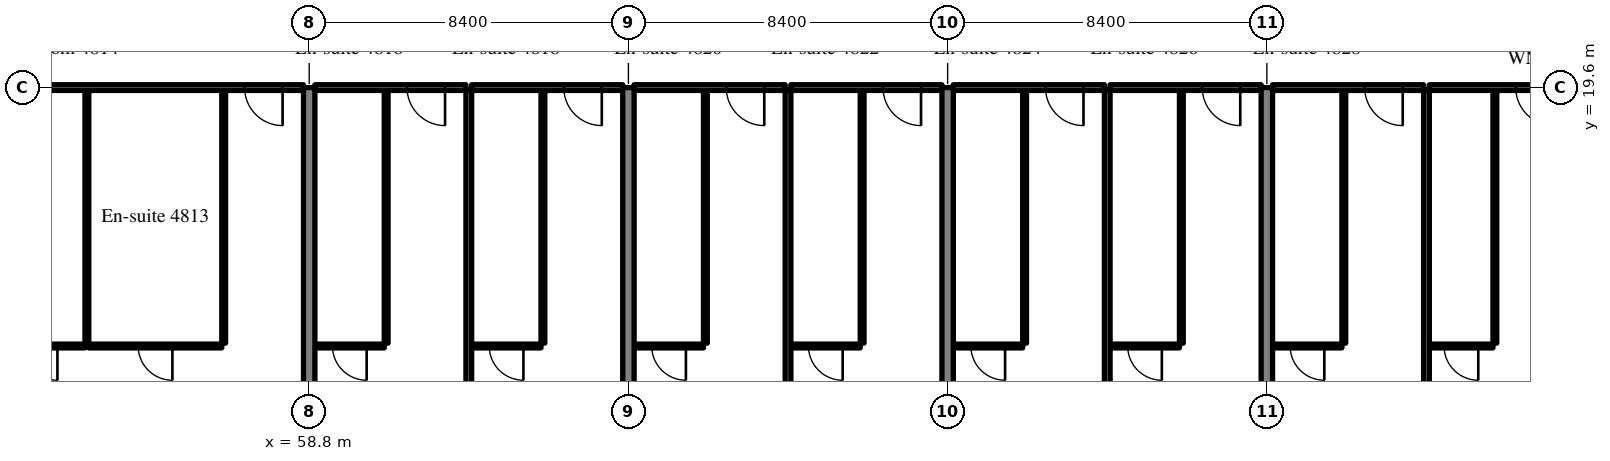
"""IFC4 building model, lengths in metres.
Left out: names, types, materials, properties, quantities, classifications, styles, units other than length and angle.
Written with IfcOpenShell. Run it as: python <this file> out.ifc"""

import sys

from ifc_helpers import new_model, si_unit, direction, frame, frame_2d, origin, place, context, subcontext, project, spatial, rectangle, extrude, source, transform, mapped, element, fill, save


model = new_model("IFC4")
c1 = context("Model", 3, precision=1e-05, world=origin(), true_north=direction((0.0, 1.0)))
c2 = subcontext(c1, "Body", "Model", "MODEL_VIEW")
j1 = project(units=[si_unit("LENGTHUNIT", "METRE"), si_unit("PLANEANGLEUNIT", "RADIAN")], contexts=[c1])
p1 = place(None, origin())
s1 = spatial("IfcSite", under=j1, at=p1, CompositionType="ELEMENT")
p2 = place(p1, origin())
s2 = spatial("IfcBuilding", under=s1, at=p2, CompositionType="ELEMENT")
p3 = place(p2, frame((0.0, 0.0, 197.2)))
s3 = spatial("IfcBuildingStorey", under=s2, at=p3, CompositionType="ELEMENT", Elevation=197.2)
m1 = source(origin(), c2, "Body", "SweptSolid", [
    extrude(rectangle(XDim=14.1, YDim=0.3, at=frame_2d((7.05, 0.0))), origin(), (0.0, 0.0, 1.0), 3.52),
])
for number, where, z_axis, x_axis in (
    (1, (58.8, 5.5, 0.0), (0.0, 0.0, 1.0), (0.0, 1.0, 0.0)),
    (2, (67.2, 5.5, 0.0), (0.0, 0.0, 1.0), (0.0, 1.0, 0.0)),
    (3, (75.6, 5.5, 0.0), (0.0, 0.0, 1.0), (0.0, 1.0, 0.0)),
    (4, (84.0, 5.5, 0.0), (0.0, 0.0, 1.0), (0.0, 1.0, 0.0)),
):
    element("IfcWall", number, at=place(p3, frame(where, z_axis=z_axis, x_axis=x_axis)), inside=s3, PredefinedType="SHEAR", context=c2, shape_type="MappedRepresentation", body=[
        mapped(m1, transform((0.0, 0.0, 0.0), scale=1.0)),
    ])
m2 = source(origin(), c2, "Body", "SweptSolid", [
    extrude(rectangle(XDim=6.65, YDim=0.1, at=frame_2d((3.325, 0.0))), origin(), (0.0, 0.0, 1.0), 3.52),
])
for number, where, z_axis, x_axis in (
    (5, (56.55, 12.875, 0.0), (0.0, 0.0, 1.0), (0.0, 1.0, 0.0)),
    (6, (52.95, 12.875, 0.0), (0.0, 0.0, 1.0), (0.0, 1.0, 0.0)),
):
    element("IfcWall", number, at=place(p3, frame(where, z_axis=z_axis, x_axis=x_axis)), inside=s3, PredefinedType="PARTITIONING", context=c2, shape_type="MappedRepresentation", body=[
        mapped(m2, transform((0.0, 0.0, 0.0), scale=1.0)),
    ])
m3 = source(origin(), c2, "Body", "SweptSolid", [
    extrude(rectangle(XDim=3.5, YDim=0.1, at=frame_2d((1.75, 0.0))), origin(), (0.0, 0.0, 1.0), 3.52),
])
p4 = place(p3, frame((53.0, 12.8, 0.0), z_axis=(0.0, 0.0, 1.0), x_axis=(1.0, 0.0, 0.0)))
e7 = element("IfcWall", 7, at=p4, inside=s3, PredefinedType="PARTITIONING", context=c2, shape_type="MappedRepresentation", body=[
    mapped(m3, transform((0.0, 0.0, 0.0), scale=1.0)),
])
m4 = source(origin(), c2, "Body", "SweptSolid", [
    extrude(rectangle(XDim=0.9, YDim=2.1, at=frame_2d((0.45, 1.05))), frame((0.0, 0.06, 0.0), z_axis=(0.0, -1.0, 0.0), x_axis=(1.0, 0.0, 0.0)), (0.0, 0.0, 1.0), 0.12),
])
p5 = place(p4, frame((1.3, 0.0, 0.0)))
e8 = element("IfcOpeningElement", 8, at=p5, cuts=e7, PredefinedType="OPENING", context=c2, shape_type="MappedRepresentation", body=[
    mapped(m4, transform((0.0, 0.0, 0.0), scale=1.0)),
])
m5 = source(origin(), c2, "Body", "SweptSolid", [
    extrude(rectangle(XDim=2.35, YDim=0.1, at=frame_2d((1.175, 0.0))), origin(), (0.0, 0.0, 1.0), 3.52),
])
p6 = place(p3, frame((50.55, 12.8, 0.0), z_axis=(0.0, 0.0, 1.0), x_axis=(1.0, 0.0, 0.0)))
e9 = element("IfcWall", 9, at=p6, inside=s3, PredefinedType="PARTITIONING", context=c2, shape_type="MappedRepresentation", body=[
    mapped(m5, transform((0.0, 0.0, 0.0), scale=1.0)),
])
p7 = place(p6, frame((0.725, 0.0, 0.0)))
e10 = element("IfcOpeningElement", 10, at=p7, cuts=e9, PredefinedType="OPENING", context=c2, shape_type="MappedRepresentation", body=[
    mapped(m4, transform((0.0, 0.0, 0.0), scale=1.0)),
])
m6 = source(origin(), c2, "Body", "SweptSolid", [
    extrude(rectangle(XDim=8.1, YDim=0.15, at=frame_2d((4.05, 0.0))), origin(), (0.0, 0.0, 1.0), 2.82),
])
p8 = place(p3, frame((50.55, 19.6, 0.0), z_axis=(0.0, 0.0, 1.0), x_axis=(1.0, 0.0, 0.0)))
e11 = element("IfcWall", 11, at=p8, inside=s3, PredefinedType="PARTITIONING", context=c2, shape_type="MappedRepresentation", body=[
    mapped(m6, transform((0.0, 0.0, 0.0), scale=1.0)),
])
m7 = source(origin(), c2, "Body", "SweptSolid", [
    extrude(rectangle(XDim=1.0, YDim=2.1, at=frame_2d((0.5, 1.05))), frame((0.0, 0.085, 0.0), z_axis=(0.0, -1.0, 0.0), x_axis=(1.0, 0.0, 0.0)), (0.0, 0.0, 1.0), 0.17),
])
p9 = place(p8, frame((6.55, 0.0, 0.0)))
e12 = element("IfcOpeningElement", 12, at=p9, cuts=e11, PredefinedType="OPENING", context=c2, shape_type="MappedRepresentation", body=[
    mapped(m7, transform((0.0, 0.0, 0.0), scale=1.0)),
])
p10 = place(p3, frame((60.825, 12.875, 0.0), z_axis=(0.0, 0.0, 1.0), x_axis=(0.0, 1.0, 0.0)))
e13 = element("IfcWall", 13, at=p10, inside=s3, PredefinedType="PARTITIONING", context=c2, shape_type="MappedRepresentation", body=[
    mapped(m2, transform((0.0, 0.0, 0.0), scale=1.0)),
])
m8 = source(origin(), c2, "Body", "SweptSolid", [
    extrude(rectangle(XDim=1.825, YDim=0.1, at=frame_2d((0.913, 0.0))), origin(), (0.0, 0.0, 1.0), 3.52),
])
p11 = place(p3, frame((58.95, 12.8, 0.0), z_axis=(0.0, 0.0, 1.0), x_axis=(1.0, 0.0, 0.0)))
e14 = element("IfcWall", 14, at=p11, inside=s3, PredefinedType="PARTITIONING", context=c2, shape_type="MappedRepresentation", body=[
    mapped(m8, transform((0.0, 0.0, 0.0), scale=1.0)),
])
p12 = place(p11, frame((0.462, 0.0, 0.0)))
e15 = element("IfcOpeningElement", 15, at=p12, cuts=e14, PredefinedType="OPENING", context=c2, shape_type="MappedRepresentation", body=[
    mapped(m4, transform((0.0, 0.0, 0.0), scale=1.0)),
])
m9 = source(origin(), c2, "Body", "SweptSolid", [
    extrude(rectangle(XDim=3.975, YDim=0.15, at=frame_2d((1.988, 0.0))), origin(), (0.0, 0.0, 1.0), 2.82),
])
p13 = place(p3, frame((58.95, 19.6, 0.0), z_axis=(0.0, 0.0, 1.0), x_axis=(1.0, 0.0, 0.0)))
e16 = element("IfcWall", 16, at=p13, inside=s3, PredefinedType="PARTITIONING", context=c2, shape_type="MappedRepresentation", body=[
    mapped(m9, transform((0.0, 0.0, 0.0), scale=1.0)),
])
p14 = place(p13, frame((2.425, 0.0, 0.0)))
e17 = element("IfcOpeningElement", 17, at=p14, cuts=e16, PredefinedType="OPENING", context=c2, shape_type="MappedRepresentation", body=[
    mapped(m7, transform((0.0, 0.0, 0.0), scale=1.0)),
])
p15 = place(p3, frame((64.95, 12.875, 0.0), z_axis=(0.0, 0.0, 1.0), x_axis=(0.0, 1.0, 0.0)))
e18 = element("IfcWall", 18, at=p15, inside=s3, PredefinedType="PARTITIONING", context=c2, shape_type="MappedRepresentation", body=[
    mapped(m2, transform((0.0, 0.0, 0.0), scale=1.0)),
])
p16 = place(p3, frame((63.075, 12.8, 0.0), z_axis=(0.0, 0.0, 1.0), x_axis=(1.0, 0.0, 0.0)))
e19 = element("IfcWall", 19, at=p16, inside=s3, PredefinedType="PARTITIONING", context=c2, shape_type="MappedRepresentation", body=[
    mapped(m8, transform((0.0, 0.0, 0.0), scale=1.0)),
])
p17 = place(p16, frame((0.462, 0.0, 0.0)))
e20 = element("IfcOpeningElement", 20, at=p17, cuts=e19, PredefinedType="OPENING", context=c2, shape_type="MappedRepresentation", body=[
    mapped(m4, transform((0.0, 0.0, 0.0), scale=1.0)),
])
p18 = place(p3, frame((63.075, 19.6, 0.0), z_axis=(0.0, 0.0, 1.0), x_axis=(1.0, 0.0, 0.0)))
e21 = element("IfcWall", 21, at=p18, inside=s3, PredefinedType="PARTITIONING", context=c2, shape_type="MappedRepresentation", body=[
    mapped(m9, transform((0.0, 0.0, 0.0), scale=1.0)),
])
p19 = place(p18, frame((2.425, 0.0, 0.0)))
e22 = element("IfcOpeningElement", 22, at=p19, cuts=e21, PredefinedType="OPENING", context=c2, shape_type="MappedRepresentation", body=[
    mapped(m7, transform((0.0, 0.0, 0.0), scale=1.0)),
])
m10 = source(origin(), c2, "Body", "SweptSolid", [
    extrude(rectangle(XDim=15.498, YDim=0.15, at=frame_2d((7.749, 0.0))), origin(), (0.0, 0.0, 1.0), 3.52),
])
p20 = place(p3, frame((63.0, 4.027, 0.0), z_axis=(0.0, 0.0, 1.0), x_axis=(0.0, 1.0, 0.0)))
e23 = element("IfcWall", 23, at=p20, inside=s3, PredefinedType="PARTITIONING", context=c2, shape_type="MappedRepresentation", body=[
    mapped(m10, transform((0.0, 0.0, 0.0), scale=1.0)),
])
p21 = place(p3, frame((69.225, 12.875, 0.0), z_axis=(0.0, 0.0, 1.0), x_axis=(0.0, 1.0, 0.0)))
e24 = element("IfcWall", 24, at=p21, inside=s3, PredefinedType="PARTITIONING", context=c2, shape_type="MappedRepresentation", body=[
    mapped(m2, transform((0.0, 0.0, 0.0), scale=1.0)),
])
p22 = place(p3, frame((67.35, 12.8, 0.0), z_axis=(0.0, 0.0, 1.0), x_axis=(1.0, 0.0, 0.0)))
e25 = element("IfcWall", 25, at=p22, inside=s3, PredefinedType="PARTITIONING", context=c2, shape_type="MappedRepresentation", body=[
    mapped(m8, transform((0.0, 0.0, 0.0), scale=1.0)),
])
p23 = place(p22, frame((0.463, 0.0, 0.0)))
e26 = element("IfcOpeningElement", 26, at=p23, cuts=e25, PredefinedType="OPENING", context=c2, shape_type="MappedRepresentation", body=[
    mapped(m4, transform((0.0, 0.0, 0.0), scale=1.0)),
])
m11 = source(origin(), c2, "Body", "SweptSolid", [
    extrude(rectangle(XDim=3.975, YDim=0.15, at=frame_2d((1.987, 0.0))), origin(), (0.0, 0.0, 1.0), 2.82),
])
p24 = place(p3, frame((67.35, 19.6, 0.0), z_axis=(0.0, 0.0, 1.0), x_axis=(1.0, 0.0, 0.0)))
e27 = element("IfcWall", 27, at=p24, inside=s3, PredefinedType="PARTITIONING", context=c2, shape_type="MappedRepresentation", body=[
    mapped(m11, transform((0.0, 0.0, 0.0), scale=1.0)),
])
p25 = place(p24, frame((2.425, 0.0, 0.0)))
e28 = element("IfcOpeningElement", 28, at=p25, cuts=e27, PredefinedType="OPENING", context=c2, shape_type="MappedRepresentation", body=[
    mapped(m7, transform((0.0, 0.0, 0.0), scale=1.0)),
])
p26 = place(p3, frame((73.35, 12.875, 0.0), z_axis=(0.0, 0.0, 1.0), x_axis=(0.0, 1.0, 0.0)))
e29 = element("IfcWall", 29, at=p26, inside=s3, PredefinedType="PARTITIONING", context=c2, shape_type="MappedRepresentation", body=[
    mapped(m2, transform((0.0, 0.0, 0.0), scale=1.0)),
])
p27 = place(p3, frame((71.475, 12.8, 0.0), z_axis=(0.0, 0.0, 1.0), x_axis=(1.0, 0.0, 0.0)))
e30 = element("IfcWall", 30, at=p27, inside=s3, PredefinedType="PARTITIONING", context=c2, shape_type="MappedRepresentation", body=[
    mapped(m8, transform((0.0, 0.0, 0.0), scale=1.0)),
])
p28 = place(p27, frame((0.463, 0.0, 0.0)))
e31 = element("IfcOpeningElement", 31, at=p28, cuts=e30, PredefinedType="OPENING", context=c2, shape_type="MappedRepresentation", body=[
    mapped(m4, transform((0.0, 0.0, 0.0), scale=1.0)),
])
p29 = place(p3, frame((71.475, 19.6, 0.0), z_axis=(0.0, 0.0, 1.0), x_axis=(1.0, 0.0, 0.0)))
e32 = element("IfcWall", 32, at=p29, inside=s3, PredefinedType="PARTITIONING", context=c2, shape_type="MappedRepresentation", body=[
    mapped(m11, transform((0.0, 0.0, 0.0), scale=1.0)),
])
p30 = place(p29, frame((2.425, 0.0, 0.0)))
e33 = element("IfcOpeningElement", 33, at=p30, cuts=e32, PredefinedType="OPENING", context=c2, shape_type="MappedRepresentation", body=[
    mapped(m7, transform((0.0, 0.0, 0.0), scale=1.0)),
])
m12 = source(origin(), c2, "Body", "SweptSolid", [
    extrude(rectangle(XDim=12.275, YDim=0.15, at=frame_2d((6.137, 0.0))), origin(), (0.0, 0.0, 1.0), 3.52),
])
p31 = place(p3, frame((71.4, 7.25, 0.0), z_axis=(0.0, 0.0, 1.0), x_axis=(0.0, 1.0, 0.0)))
e34 = element("IfcWall", 34, at=p31, inside=s3, PredefinedType="PARTITIONING", context=c2, shape_type="MappedRepresentation", body=[
    mapped(m12, transform((0.0, 0.0, 0.0), scale=1.0)),
])
p32 = place(p3, frame((77.625, 12.875, 0.0), z_axis=(0.0, 0.0, 1.0), x_axis=(0.0, 1.0, 0.0)))
e35 = element("IfcWall", 35, at=p32, inside=s3, PredefinedType="PARTITIONING", context=c2, shape_type="MappedRepresentation", body=[
    mapped(m2, transform((0.0, 0.0, 0.0), scale=1.0)),
])
p33 = place(p3, frame((75.75, 12.8, 0.0), z_axis=(0.0, 0.0, 1.0), x_axis=(1.0, 0.0, 0.0)))
e36 = element("IfcWall", 36, at=p33, inside=s3, PredefinedType="PARTITIONING", context=c2, shape_type="MappedRepresentation", body=[
    mapped(m8, transform((0.0, 0.0, 0.0), scale=1.0)),
])
p34 = place(p33, frame((0.462, 0.0, 0.0)))
e37 = element("IfcOpeningElement", 37, at=p34, cuts=e36, PredefinedType="OPENING", context=c2, shape_type="MappedRepresentation", body=[
    mapped(m4, transform((0.0, 0.0, 0.0), scale=1.0)),
])
p35 = place(p3, frame((75.75, 19.6, 0.0), z_axis=(0.0, 0.0, 1.0), x_axis=(1.0, 0.0, 0.0)))
e38 = element("IfcWall", 38, at=p35, inside=s3, PredefinedType="PARTITIONING", context=c2, shape_type="MappedRepresentation", body=[
    mapped(m9, transform((0.0, 0.0, 0.0), scale=1.0)),
])
p36 = place(p35, frame((2.425, 0.0, 0.0)))
e39 = element("IfcOpeningElement", 39, at=p36, cuts=e38, PredefinedType="OPENING", context=c2, shape_type="MappedRepresentation", body=[
    mapped(m7, transform((0.0, 0.0, 0.0), scale=1.0)),
])
p37 = place(p3, frame((81.75, 12.875, 0.0), z_axis=(0.0, 0.0, 1.0), x_axis=(0.0, 1.0, 0.0)))
e40 = element("IfcWall", 40, at=p37, inside=s3, PredefinedType="PARTITIONING", context=c2, shape_type="MappedRepresentation", body=[
    mapped(m2, transform((0.0, 0.0, 0.0), scale=1.0)),
])
p38 = place(p3, frame((79.875, 12.8, 0.0), z_axis=(0.0, 0.0, 1.0), x_axis=(1.0, 0.0, 0.0)))
e41 = element("IfcWall", 41, at=p38, inside=s3, PredefinedType="PARTITIONING", context=c2, shape_type="MappedRepresentation", body=[
    mapped(m8, transform((0.0, 0.0, 0.0), scale=1.0)),
])
p39 = place(p38, frame((0.462, 0.0, 0.0)))
e42 = element("IfcOpeningElement", 42, at=p39, cuts=e41, PredefinedType="OPENING", context=c2, shape_type="MappedRepresentation", body=[
    mapped(m4, transform((0.0, 0.0, 0.0), scale=1.0)),
])
p40 = place(p3, frame((79.875, 19.6, 0.0), z_axis=(0.0, 0.0, 1.0), x_axis=(1.0, 0.0, 0.0)))
e43 = element("IfcWall", 43, at=p40, inside=s3, PredefinedType="PARTITIONING", context=c2, shape_type="MappedRepresentation", body=[
    mapped(m9, transform((0.0, 0.0, 0.0), scale=1.0)),
])
p41 = place(p40, frame((2.425, 0.0, 0.0)))
e44 = element("IfcOpeningElement", 44, at=p41, cuts=e43, PredefinedType="OPENING", context=c2, shape_type="MappedRepresentation", body=[
    mapped(m7, transform((0.0, 0.0, 0.0), scale=1.0)),
])
p42 = place(p3, frame((79.8, 7.25, 0.0), z_axis=(0.0, 0.0, 1.0), x_axis=(0.0, 1.0, 0.0)))
e45 = element("IfcWall", 45, at=p42, inside=s3, PredefinedType="PARTITIONING", context=c2, shape_type="MappedRepresentation", body=[
    mapped(m12, transform((0.0, 0.0, 0.0), scale=1.0)),
])
p43 = place(p3, frame((86.025, 12.875, 0.0), z_axis=(0.0, 0.0, 1.0), x_axis=(0.0, 1.0, 0.0)))
e46 = element("IfcWall", 46, at=p43, inside=s3, PredefinedType="PARTITIONING", context=c2, shape_type="MappedRepresentation", body=[
    mapped(m2, transform((0.0, 0.0, 0.0), scale=1.0)),
])
m13 = source(origin(), c2, "Body", "SweptSolid", [
    extrude(rectangle(XDim=1.825, YDim=0.1, at=frame_2d((0.913, 0.0))), origin(), (0.0, 0.0, 1.0), 3.52),
])
p44 = place(p3, frame((84.15, 12.8, 0.0), z_axis=(0.0, 0.0, 1.0), x_axis=(1.0, 0.0, 0.0)))
e47 = element("IfcWall", 47, at=p44, inside=s3, PredefinedType="PARTITIONING", context=c2, shape_type="MappedRepresentation", body=[
    mapped(m13, transform((0.0, 0.0, 0.0), scale=1.0)),
])
p45 = place(p44, frame((0.462, 0.0, 0.0)))
e48 = element("IfcOpeningElement", 48, at=p45, cuts=e47, PredefinedType="OPENING", context=c2, shape_type="MappedRepresentation", body=[
    mapped(m4, transform((0.0, 0.0, 0.0), scale=1.0)),
])
p46 = place(p3, frame((84.15, 19.6, 0.0), z_axis=(0.0, 0.0, 1.0), x_axis=(1.0, 0.0, 0.0)))
e49 = element("IfcWall", 49, at=p46, inside=s3, PredefinedType="PARTITIONING", context=c2, shape_type="MappedRepresentation", body=[
    mapped(m9, transform((0.0, 0.0, 0.0), scale=1.0)),
])
p47 = place(p46, frame((2.425, 0.0, 0.0)))
e50 = element("IfcOpeningElement", 50, at=p47, cuts=e49, PredefinedType="OPENING", context=c2, shape_type="MappedRepresentation", body=[
    mapped(m7, transform((0.0, 0.0, 0.0), scale=1.0)),
])
p48 = place(p3, frame((90.0, 12.875, 0.0), z_axis=(0.0, 0.0, 1.0), x_axis=(0.0, 1.0, 0.0)))
e51 = element("IfcWall", 51, at=p48, inside=s3, PredefinedType="PARTITIONING", context=c2, shape_type="MappedRepresentation", body=[
    mapped(m2, transform((0.0, 0.0, 0.0), scale=1.0)),
])
m14 = source(origin(), c2, "Body", "SweptSolid", [
    extrude(rectangle(XDim=1.675, YDim=0.1, at=frame_2d((0.837, 0.0))), origin(), (0.0, 0.0, 1.0), 3.52),
])
p49 = place(p3, frame((88.275, 12.8, 0.0), z_axis=(0.0, 0.0, 1.0), x_axis=(1.0, 0.0, 0.0)))
e52 = element("IfcWall", 52, at=p49, inside=s3, PredefinedType="PARTITIONING", context=c2, shape_type="MappedRepresentation", body=[
    mapped(m14, transform((0.0, 0.0, 0.0), scale=1.0)),
])
p50 = place(p49, frame((0.388, 0.0, 0.0)))
e53 = element("IfcOpeningElement", 53, at=p50, cuts=e52, PredefinedType="OPENING", context=c2, shape_type="MappedRepresentation", body=[
    mapped(m4, transform((0.0, 0.0, 0.0), scale=1.0)),
])
m15 = source(origin(), c2, "Body", "SweptSolid", [
    extrude(rectangle(XDim=3.825, YDim=0.15, at=frame_2d((1.913, 0.0))), origin(), (0.0, 0.0, 1.0), 2.82),
])
p51 = place(p3, frame((88.275, 19.6, 0.0), z_axis=(0.0, 0.0, 1.0), x_axis=(1.0, 0.0, 0.0)))
e54 = element("IfcWall", 54, at=p51, inside=s3, PredefinedType="PARTITIONING", context=c2, shape_type="MappedRepresentation", body=[
    mapped(m15, transform((0.0, 0.0, 0.0), scale=1.0)),
])
p52 = place(p51, frame((2.275, 0.0, 0.0)))
e55 = element("IfcOpeningElement", 55, at=p52, cuts=e54, PredefinedType="OPENING", context=c2, shape_type="MappedRepresentation", body=[
    mapped(m7, transform((0.0, 0.0, 0.0), scale=1.0)),
])
m16 = source(origin(), c2, "Body", "SweptSolid", [
    extrude(rectangle(XDim=13.447, YDim=0.15, at=frame_2d((6.724, 0.0))), origin(), (0.0, 0.0, 1.0), 3.52),
])
p53 = place(p3, frame((88.2, 6.078, 0.0), z_axis=(0.0, 0.0, 1.0), x_axis=(0.0, 1.0, 0.0)))
e56 = element("IfcWall", 56, at=p53, inside=s3, PredefinedType="PARTITIONING", context=c2, shape_type="MappedRepresentation", body=[
    mapped(m16, transform((0.0, 0.0, 0.0), scale=1.0)),
])
m17 = source(origin(), c2, "Body", "SweptSolid", [
    extrude(rectangle(XDim=0.9, YDim=2.1, at=frame_2d((0.45, 1.05))), frame((0.0, 0.025, 0.0), z_axis=(0.0, -1.0, 0.0), x_axis=(1.0, 0.0, 0.0)), (0.0, 0.0, 1.0), 0.05),
])
p54 = place(p5, origin())
e57 = element("IfcDoor", 57, at=p54, inside=s3, OperationType="SINGLE_SWING_RIGHT", PredefinedType="DOOR", context=c2, shape_type="MappedRepresentation", body=[
    mapped(m17, transform((0.0, 0.0, 0.0), scale=1.0)),
])
fill(e8, e57)
p55 = place(p7, origin())
e58 = element("IfcDoor", 58, at=p55, inside=s3, OperationType="SINGLE_SWING_RIGHT", PredefinedType="DOOR", context=c2, shape_type="MappedRepresentation", body=[
    mapped(m17, transform((0.0, 0.0, 0.0), scale=1.0)),
])
fill(e10, e58)
m18 = source(origin(), c2, "Body", "SweptSolid", [
    extrude(rectangle(XDim=1.0, YDim=2.1, at=frame_2d((0.5, 1.05))), frame((0.0, 0.025, 0.0), z_axis=(0.0, -1.0, 0.0), x_axis=(1.0, 0.0, 0.0)), (0.0, 0.0, 1.0), 0.05),
])
p56 = place(p9, origin())
e59 = element("IfcDoor", 59, at=p56, inside=s3, OperationType="SINGLE_SWING_RIGHT", PredefinedType="DOOR", context=c2, shape_type="MappedRepresentation", body=[
    mapped(m18, transform((0.0, 0.0, 0.0), scale=1.0)),
])
fill(e12, e59)
p57 = place(p12, origin())
e60 = element("IfcDoor", 60, at=p57, inside=s3, OperationType="SINGLE_SWING_RIGHT", PredefinedType="DOOR", context=c2, shape_type="MappedRepresentation", body=[
    mapped(m17, transform((0.0, 0.0, 0.0), scale=1.0)),
])
fill(e15, e60)
p58 = place(p14, origin())
e61 = element("IfcDoor", 61, at=p58, inside=s3, OperationType="SINGLE_SWING_RIGHT", PredefinedType="DOOR", context=c2, shape_type="MappedRepresentation", body=[
    mapped(m18, transform((0.0, 0.0, 0.0), scale=1.0)),
])
fill(e17, e61)
p59 = place(p17, origin())
e62 = element("IfcDoor", 62, at=p59, inside=s3, OperationType="SINGLE_SWING_RIGHT", PredefinedType="DOOR", context=c2, shape_type="MappedRepresentation", body=[
    mapped(m17, transform((0.0, 0.0, 0.0), scale=1.0)),
])
fill(e20, e62)
p60 = place(p19, origin())
e63 = element("IfcDoor", 63, at=p60, inside=s3, OperationType="SINGLE_SWING_RIGHT", PredefinedType="DOOR", context=c2, shape_type="MappedRepresentation", body=[
    mapped(m18, transform((0.0, 0.0, 0.0), scale=1.0)),
])
fill(e22, e63)
p61 = place(p23, origin())
e64 = element("IfcDoor", 64, at=p61, inside=s3, OperationType="SINGLE_SWING_RIGHT", PredefinedType="DOOR", context=c2, shape_type="MappedRepresentation", body=[
    mapped(m17, transform((0.0, 0.0, 0.0), scale=1.0)),
])
fill(e26, e64)
p62 = place(p25, origin())
e65 = element("IfcDoor", 65, at=p62, inside=s3, OperationType="SINGLE_SWING_RIGHT", PredefinedType="DOOR", context=c2, shape_type="MappedRepresentation", body=[
    mapped(m18, transform((0.0, 0.0, 0.0), scale=1.0)),
])
fill(e28, e65)
p63 = place(p28, origin())
e66 = element("IfcDoor", 66, at=p63, inside=s3, OperationType="SINGLE_SWING_RIGHT", PredefinedType="DOOR", context=c2, shape_type="MappedRepresentation", body=[
    mapped(m17, transform((0.0, 0.0, 0.0), scale=1.0)),
])
fill(e31, e66)
p64 = place(p30, origin())
e67 = element("IfcDoor", 67, at=p64, inside=s3, OperationType="SINGLE_SWING_RIGHT", PredefinedType="DOOR", context=c2, shape_type="MappedRepresentation", body=[
    mapped(m18, transform((0.0, 0.0, 0.0), scale=1.0)),
])
fill(e33, e67)
p65 = place(p34, origin())
e68 = element("IfcDoor", 68, at=p65, inside=s3, OperationType="SINGLE_SWING_RIGHT", PredefinedType="DOOR", context=c2, shape_type="MappedRepresentation", body=[
    mapped(m17, transform((0.0, 0.0, 0.0), scale=1.0)),
])
fill(e37, e68)
p66 = place(p36, origin())
e69 = element("IfcDoor", 69, at=p66, inside=s3, OperationType="SINGLE_SWING_RIGHT", PredefinedType="DOOR", context=c2, shape_type="MappedRepresentation", body=[
    mapped(m18, transform((0.0, 0.0, 0.0), scale=1.0)),
])
fill(e39, e69)
p67 = place(p39, origin())
e70 = element("IfcDoor", 70, at=p67, inside=s3, OperationType="SINGLE_SWING_RIGHT", PredefinedType="DOOR", context=c2, shape_type="MappedRepresentation", body=[
    mapped(m17, transform((0.0, 0.0, 0.0), scale=1.0)),
])
fill(e42, e70)
p68 = place(p41, origin())
e71 = element("IfcDoor", 71, at=p68, inside=s3, OperationType="SINGLE_SWING_RIGHT", PredefinedType="DOOR", context=c2, shape_type="MappedRepresentation", body=[
    mapped(m18, transform((0.0, 0.0, 0.0), scale=1.0)),
])
fill(e44, e71)
p69 = place(p45, origin())
e72 = element("IfcDoor", 72, at=p69, inside=s3, OperationType="SINGLE_SWING_RIGHT", PredefinedType="DOOR", context=c2, shape_type="MappedRepresentation", body=[
    mapped(m17, transform((0.0, 0.0, 0.0), scale=1.0)),
])
fill(e48, e72)
p70 = place(p47, origin())
e73 = element("IfcDoor", 73, at=p70, inside=s3, OperationType="SINGLE_SWING_RIGHT", PredefinedType="DOOR", context=c2, shape_type="MappedRepresentation", body=[
    mapped(m18, transform((0.0, 0.0, 0.0), scale=1.0)),
])
fill(e50, e73)
p71 = place(p50, origin())
e74 = element("IfcDoor", 74, at=p71, inside=s3, OperationType="SINGLE_SWING_RIGHT", PredefinedType="DOOR", context=c2, shape_type="MappedRepresentation", body=[
    mapped(m17, transform((0.0, 0.0, 0.0), scale=1.0)),
])
fill(e53, e74)
p72 = place(p52, origin())
e75 = element("IfcDoor", 75, at=p72, inside=s3, OperationType="SINGLE_SWING_RIGHT", PredefinedType="DOOR", context=c2, shape_type="MappedRepresentation", body=[
    mapped(m18, transform((0.0, 0.0, 0.0), scale=1.0)),
])
fill(e55, e75)
save(model, sys.argv[1])
